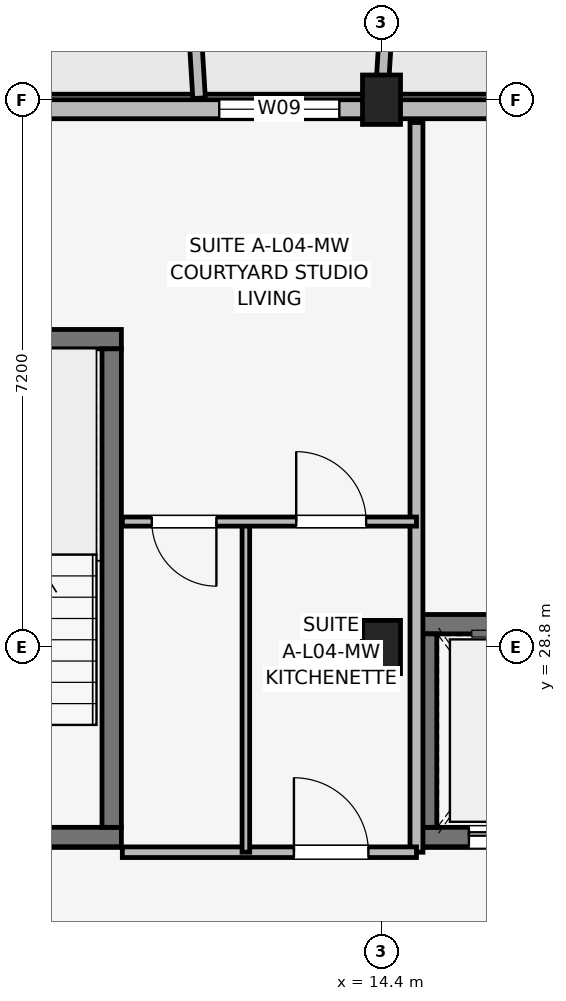
"""IFC4 building model, lengths in metres.
Left out: names, types, materials, properties, quantities, classifications, styles, units other than length and angle.
Written with IfcOpenShell. Run it as: python <this file> out.ifc"""

import sys

from ifc_helpers import new_model, si_unit, direction, frame, frame_2d, origin, origin_2d, place, context, subcontext, project, spatial, rectangle, extrude, element, fill, save


model = new_model("IFC4")
c1 = context("Model", 3, precision=1e-05, world=origin(), true_north=direction((0.0, 1.0)))
c2 = subcontext(c1, "Body", "Model", "MODEL_VIEW")
j1 = project(units=[si_unit("LENGTHUNIT", "METRE"), si_unit("PLANEANGLEUNIT", "RADIAN")], contexts=[c1])
p1 = place(None, origin())
s1 = spatial("IfcSite", under=j1, at=p1, CompositionType="ELEMENT")
p2 = place(p1, origin())
s2 = spatial("IfcBuilding", under=s1, at=p2, CompositionType="ELEMENT")
p3 = place(p2, frame((0.0, 0.0, 15.0)))
s3 = spatial("IfcBuildingStorey", under=s2, at=p3, CompositionType="ELEMENT", Elevation=15.0)
p4 = place(p3, frame((14.4, 28.8, 0.0), z_axis=(0.0, 0.0, 1.0), x_axis=(1.0, 0.0, 0.0)))
e1 = element("IfcColumn", 1, at=p4, inside=s3, PredefinedType="COLUMN", context=c2, shape_type="SweptSolid", body=[
    extrude(rectangle(XDim=0.5, YDim=0.7, at=origin_2d()), origin(), (0.0, 0.0, 1.0), 3.15),
])
p5 = place(p3, frame((14.4, 36.0, 0.0), z_axis=(0.0, 0.0, 1.0), x_axis=(1.0, 0.0, 0.0)))
e2 = element("IfcColumn", 2, at=p5, inside=s3, PredefinedType="COLUMN", context=c2, shape_type="SweptSolid", body=[
    extrude(rectangle(XDim=0.5, YDim=0.65, at=origin_2d()), origin(), (0.0, 0.0, 1.0), 3.15),
])
p6 = place(p3, frame((7.673, 26.3, 0.0), z_axis=(0.0, 0.0, 1.0), x_axis=(1.0, 0.0, 0.0)))
e3 = element("IfcWall", 3, at=p6, inside=s3, PredefinedType="SHEAR", context=c2, shape_type="SweptSolid", body=[
    extrude(rectangle(XDim=3.305, YDim=0.255, at=frame_2d((1.652, 0.0))), origin(), (0.0, 0.0, 1.0), 3.15),
])
p7 = place(p6, frame((2.177, 0.0, 0.0), z_axis=(0.0, 0.0, 1.0), x_axis=(-1.0, 0.0, 0.0)))
e4 = element("IfcOpeningElement", 4, at=p7, cuts=e3, PredefinedType="OPENING", context=c2, shape_type="SweptSolid", body=[
    extrude(rectangle(XDim=1.05, YDim=2.12, at=frame_2d((0.525, 1.06))), frame((0.0, 0.137, 0.0), z_axis=(0.0, -1.0, 0.0), x_axis=(1.0, 0.0, 0.0)), (0.0, 0.0, 1.0), 0.275),
])
p8 = place(p3, frame((7.673, 32.85, 0.0), z_axis=(0.0, 0.0, 1.0), x_axis=(1.0, 0.0, 0.0)))
e5 = element("IfcWall", 5, at=p8, inside=s3, PredefinedType="SHEAR", context=c2, shape_type="SweptSolid", body=[
    extrude(rectangle(XDim=3.305, YDim=0.255, at=frame_2d((1.652, 0.0))), origin(), (0.0, 0.0, 1.0), 3.15),
])
p9 = place(p3, frame((10.85, 26.427, 0.0), z_axis=(0.0, 0.0, 1.0), x_axis=(0.0, 1.0, 0.0)))
e6 = element("IfcWall", 6, at=p9, inside=s3, PredefinedType="SHEAR", context=c2, shape_type="SweptSolid", body=[
    extrude(rectangle(XDim=6.295, YDim=0.255, at=frame_2d((3.147, 0.0))), origin(), (0.0, 0.0, 1.0), 3.15),
])
p10 = place(p3, frame((14.873, 26.3, 0.0), z_axis=(0.0, 0.0, 1.0), x_axis=(1.0, 0.0, 0.0)))
e7 = element("IfcWall", 7, at=p10, inside=s3, PredefinedType="SHEAR", context=c2, shape_type="SweptSolid", body=[
    extrude(rectangle(XDim=2.455, YDim=0.255, at=frame_2d((1.228, 0.0))), origin(), (0.0, 0.0, 1.0), 3.15),
])
p11 = place(p10, frame((0.677, 0.0, 0.0)))
e8 = element("IfcOpeningElement", 8, at=p11, cuts=e7, PredefinedType="OPENING", context=c2, shape_type="SweptSolid", body=[
    extrude(rectangle(XDim=1.1, YDim=2.15, at=frame_2d((0.55, 1.075))), frame((0.0, 0.137, 0.0), z_axis=(0.0, -1.0, 0.0), x_axis=(1.0, 0.0, 0.0)), (0.0, 0.0, 1.0), 0.275),
])
p12 = place(p3, frame((14.873, 29.1, 0.0), z_axis=(0.0, 0.0, 1.0), x_axis=(1.0, 0.0, 0.0)))
e9 = element("IfcWall", 9, at=p12, inside=s3, PredefinedType="SHEAR", context=c2, shape_type="SweptSolid", body=[
    extrude(rectangle(XDim=2.455, YDim=0.255, at=frame_2d((1.228, 0.0))), origin(), (0.0, 0.0, 1.0), 3.15),
])
p13 = place(p3, frame((15.0, 26.427, 0.0), z_axis=(0.0, 0.0, 1.0), x_axis=(0.0, 1.0, 0.0)))
e10 = element("IfcWall", 10, at=p13, inside=s3, PredefinedType="SHEAR", context=c2, shape_type="SweptSolid", body=[
    extrude(rectangle(XDim=2.545, YDim=0.255, at=frame_2d((1.272, 0.0))), origin(), (0.0, 0.0, 1.0), 3.15),
])
p14 = place(p3, frame((32.6, 35.875, 0.0), z_axis=(0.0, 0.0, 1.0), x_axis=(-1.0, 0.0, 0.0)))
e11 = element("IfcWall", 11, at=p14, inside=s3, PredefinedType="SOLIDWALL", context=c2, shape_type="SweptSolid", body=[
    extrude(rectangle(XDim=29.2, YDim=0.25, at=frame_2d((14.6, 0.0))), origin(), (0.0, 0.0, 1.0), 2.43),
])
p15 = place(p14, frame((27.55, 0.0, 0.0), z_axis=(0.0, 0.0, 1.0), x_axis=(-1.0, 0.0, 0.0)))
e12 = element("IfcOpeningElement", 12, at=p15, cuts=e11, PredefinedType="OPENING", context=c2, shape_type="SweptSolid", body=[
    extrude(rectangle(XDim=1.5, YDim=2.15, at=frame_2d((0.75, 1.075))), frame((0.0, 0.135, 0.0), z_axis=(0.0, -1.0, 0.0), x_axis=(1.0, 0.0, 0.0)), (0.0, 0.0, 1.0), 0.27),
])
p16 = place(p14, frame((3.15, 0.0, 0.0), z_axis=(0.0, 0.0, 1.0), x_axis=(-1.0, 0.0, 0.0)))
e13 = element("IfcOpeningElement", 13, at=p16, cuts=e11, PredefinedType="OPENING", context=c2, shape_type="SweptSolid", body=[
    extrude(rectangle(XDim=1.5, YDim=2.15, at=frame_2d((0.75, 1.075))), frame((0.0, 0.135, 0.0), z_axis=(0.0, -1.0, 0.0), x_axis=(1.0, 0.0, 0.0)), (0.0, 0.0, 1.0), 0.27),
])
p17 = place(p14, frame((14.15, 0.0, 0.5)))
e14 = element("IfcOpeningElement", 14, at=p17, cuts=e11, PredefinedType="OPENING", context=c2, shape_type="SweptSolid", body=[
    extrude(rectangle(XDim=0.9, YDim=1.8, at=frame_2d((0.45, 0.9))), frame((0.0, 0.135, 0.0), z_axis=(0.0, -1.0, 0.0), x_axis=(1.0, 0.0, 0.0)), (0.0, 0.0, 1.0), 0.27),
])
p18 = place(p14, frame((8.725, 0.0, 0.7)))
e15 = element("IfcOpeningElement", 15, at=p18, cuts=e11, PredefinedType="OPENING", context=c2, shape_type="SweptSolid", body=[
    extrude(rectangle(XDim=1.86, YDim=1.6, at=frame_2d((0.93, 0.8))), frame((0.0, 0.135, 0.0), z_axis=(0.0, -1.0, 0.0), x_axis=(1.0, 0.0, 0.0)), (0.0, 0.0, 1.0), 0.27),
])
p19 = place(p14, frame((18.755, 0.0, 0.7)))
e16 = element("IfcOpeningElement", 16, at=p19, cuts=e11, PredefinedType="OPENING", context=c2, shape_type="SweptSolid", body=[
    extrude(rectangle(XDim=1.58, YDim=1.6, at=frame_2d((0.79, 0.8))), frame((0.0, 0.135, 0.0), z_axis=(0.0, -1.0, 0.0), x_axis=(1.0, 0.0, 0.0)), (0.0, 0.0, 1.0), 0.27),
])
p20 = place(p3, frame((12.0, 36.02, 0.0), z_axis=(0.0, 0.0, 1.0), x_axis=(-0.061170732449, 0.998127317276, 0.0)))
e17 = element("IfcWall", 17, at=p20, inside=s3, PredefinedType="ELEMENTEDWALL", context=c2, shape_type="SweptSolid", body=[
    extrude(rectangle(XDim=1.964, YDim=0.165, at=frame_2d((0.982, 0.0))), origin(), (0.0, 0.0, 1.0), 2.45),
])
p21 = place(p3, frame((14.4, 36.02, 0.0), z_axis=(0.0, 0.0, 1.0), x_axis=(0.061170732449, 0.998127317276, 0.0)))
e18 = element("IfcWall", 18, at=p21, inside=s3, PredefinedType="ELEMENTEDWALL", context=c2, shape_type="SweptSolid", body=[
    extrude(rectangle(XDim=1.964, YDim=0.165, at=frame_2d((0.982, 0.0))), origin(), (0.0, 0.0, 1.0), 2.95),
])
p22 = place(p3, frame((14.86, 26.1, 0.0), z_axis=(0.0, 0.0, 1.0), x_axis=(0.0, 1.0, 0.0)))
e19 = element("IfcWall", 19, at=p22, inside=s3, PredefinedType="PARTITIONING", context=c2, shape_type="SweptSolid", body=[
    extrude(rectangle(XDim=9.6, YDim=0.17, at=frame_2d((4.8, 0.0))), origin(), (0.0, 0.0, 1.0), 2.38),
])
p23 = place(p3, frame((10.99, 26.1, 0.0), z_axis=(0.0, 0.0, 1.0), x_axis=(1.0, 0.0, 0.0)))
e20 = element("IfcWall", 20, at=p23, inside=s3, PredefinedType="PARTITIONING", context=c2, shape_type="SweptSolid", body=[
    extrude(rectangle(XDim=3.87, YDim=0.14, at=frame_2d((1.935, 0.0))), origin(), (0.0, 0.0, 1.0), 2.38),
])
p24 = place(p23, frame((2.258, 0.0, 0.0)))
e21 = element("IfcOpeningElement", 21, at=p24, cuts=e20, PredefinedType="OPENING", context=c2, shape_type="SweptSolid", body=[
    extrude(rectangle(XDim=0.98, YDim=2.1, at=frame_2d((0.49, 1.05))), frame((0.0, 0.08, 0.0), z_axis=(0.0, -1.0, 0.0), x_axis=(1.0, 0.0, 0.0)), (0.0, 0.0, 1.0), 0.16),
])
p25 = place(p3, frame((12.615, 26.1, 0.0), z_axis=(0.0, 0.0, 1.0), x_axis=(0.0, 1.0, 0.0)))
e22 = element("IfcWall", 22, at=p25, inside=s3, PredefinedType="PARTITIONING", context=c2, shape_type="SweptSolid", body=[
    extrude(rectangle(XDim=4.35, YDim=0.1, at=frame_2d((2.175, 0.0))), origin(), (0.0, 0.0, 1.0), 2.375),
])
p26 = place(p3, frame((10.99, 30.45, 0.0), z_axis=(0.0, 0.0, 1.0), x_axis=(1.0, 0.0, 0.0)))
e23 = element("IfcWall", 23, at=p26, inside=s3, PredefinedType="PARTITIONING", context=c2, shape_type="SweptSolid", body=[
    extrude(rectangle(XDim=3.87, YDim=0.12, at=frame_2d((1.935, 0.0))), origin(), (0.0, 0.0, 1.0), 2.38),
])
p27 = place(p26, frame((1.238, 0.0, 0.0), z_axis=(0.0, 0.0, 1.0), x_axis=(-1.0, 0.0, 0.0)))
e24 = element("IfcOpeningElement", 24, at=p27, cuts=e23, PredefinedType="OPENING", context=c2, shape_type="SweptSolid", body=[
    extrude(rectangle(XDim=0.85, YDim=2.08, at=frame_2d((0.425, 1.04))), frame((0.0, 0.07, 0.0), z_axis=(0.0, -1.0, 0.0), x_axis=(1.0, 0.0, 0.0)), (0.0, 0.0, 1.0), 0.14),
])
p28 = place(p26, frame((2.288, 0.0, 0.0)))
e25 = element("IfcOpeningElement", 25, at=p28, cuts=e23, PredefinedType="OPENING", context=c2, shape_type="SweptSolid", body=[
    extrude(rectangle(XDim=0.92, YDim=2.08, at=frame_2d((0.46, 1.04))), frame((0.0, 0.07, 0.0), z_axis=(0.0, -1.0, 0.0), x_axis=(1.0, 0.0, 0.0)), (0.0, 0.0, 1.0), 0.14),
])
p29 = place(p19, origin())
e26 = element("IfcWindow", 26, at=p29, inside=s3, PartitioningType="SINGLE_PANEL", PredefinedType="WINDOW", context=c2, shape_type="SweptSolid", body=[
    extrude(rectangle(XDim=1.58, YDim=1.6, at=frame_2d((0.79, 0.8))), frame((0.0, 0.03, 0.0), z_axis=(0.0, -1.0, 0.0), x_axis=(1.0, 0.0, 0.0)), (0.0, 0.0, 1.0), 0.06),
])
fill(e16, e26)
p30 = place(p24, origin())
e27 = element("IfcDoor", 27, at=p30, inside=s3, OperationType="SINGLE_SWING_LEFT", PredefinedType="DOOR", context=c2, shape_type="SweptSolid", body=[
    extrude(rectangle(XDim=0.98, YDim=2.1, at=frame_2d((0.49, 1.05))), frame((0.0, 0.025, 0.0), z_axis=(0.0, -1.0, 0.0), x_axis=(1.0, 0.0, 0.0)), (0.0, 0.0, 1.0), 0.05),
])
fill(e21, e27)
p31 = place(p27, origin())
e28 = element("IfcDoor", 28, at=p31, inside=s3, OperationType="SINGLE_SWING_RIGHT", PredefinedType="DOOR", context=c2, shape_type="SweptSolid", body=[
    extrude(rectangle(XDim=0.85, YDim=2.08, at=frame_2d((0.425, 1.04))), frame((0.0, 0.025, 0.0), z_axis=(0.0, -1.0, 0.0), x_axis=(1.0, 0.0, 0.0)), (0.0, 0.0, 1.0), 0.05),
])
fill(e24, e28)
p32 = place(p28, origin())
e29 = element("IfcDoor", 29, at=p32, inside=s3, OperationType="SINGLE_SWING_LEFT", PredefinedType="DOOR", context=c2, shape_type="SweptSolid", body=[
    extrude(rectangle(XDim=0.92, YDim=2.08, at=frame_2d((0.46, 1.04))), frame((0.0, 0.025, 0.0), z_axis=(0.0, -1.0, 0.0), x_axis=(1.0, 0.0, 0.0)), (0.0, 0.0, 1.0), 0.05),
])
fill(e25, e29)
p33 = place(p11, origin())
e30 = element("IfcDoor", 30, at=p33, inside=s3, OperationType="SLIDING_TO_LEFT", PredefinedType="DOOR", context=c2, shape_type="SweptSolid", body=[
    extrude(rectangle(XDim=1.1, YDim=2.15, at=frame_2d((0.55, 1.075))), frame((0.0, 0.025, 0.0), z_axis=(0.0, -1.0, 0.0), x_axis=(1.0, 0.0, 0.0)), (0.0, 0.0, 1.0), 0.05),
])
fill(e8, e30)
save(model, sys.argv[1])
